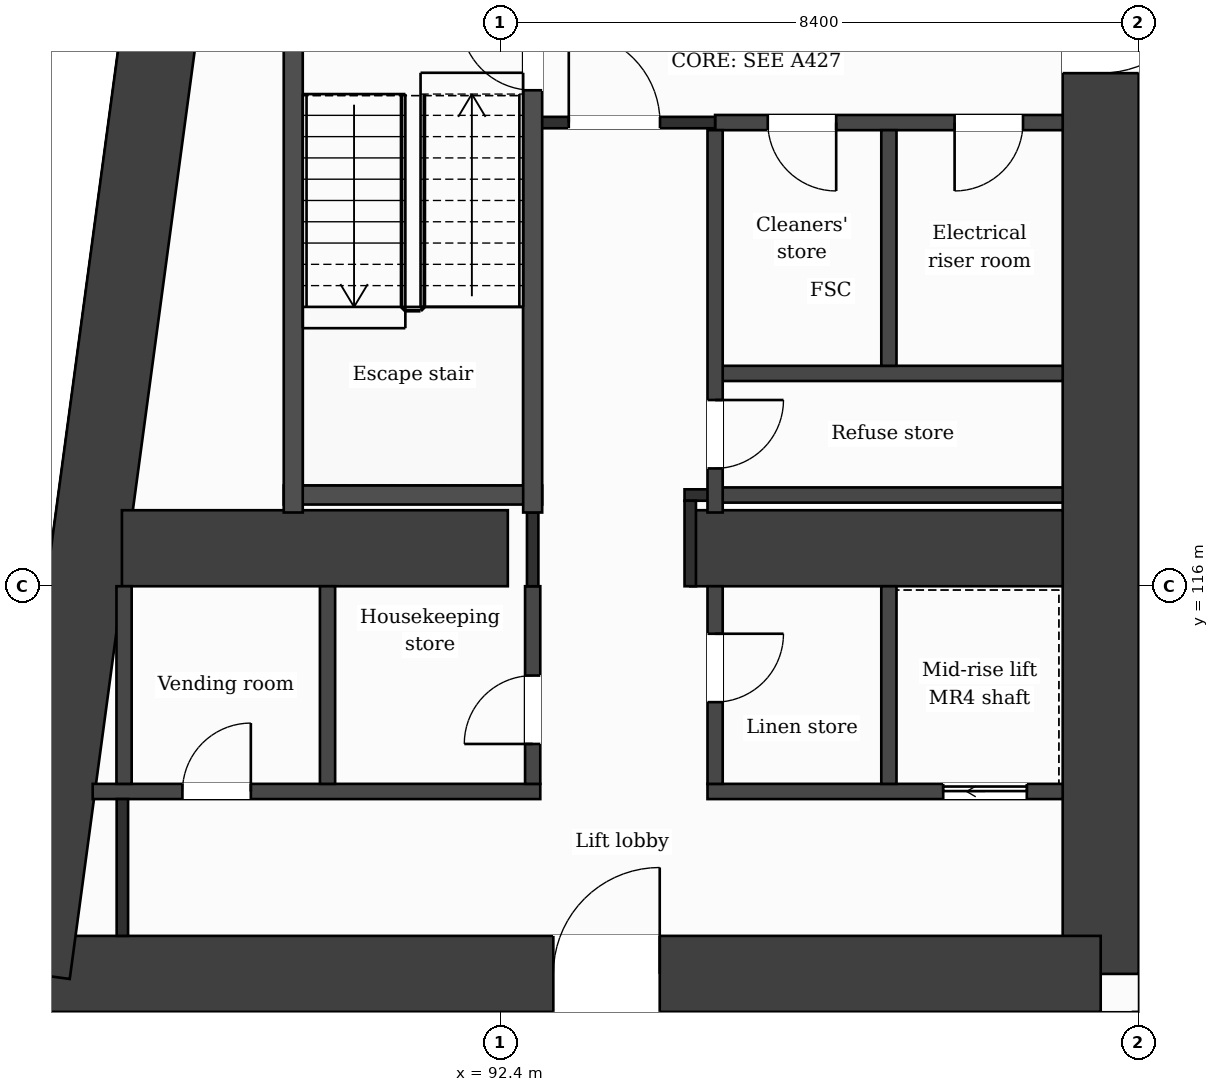
"""IFC4 building model, lengths in metres.
Left out: names, types, materials, properties, quantities, classifications, styles, units other than length and angle.
Written with IfcOpenShell. Run it as: python <this file> out.ifc"""

import sys

from ifc_helpers import new_model, si_unit, direction, frame, frame_2d, origin, place, context, subcontext, project, spatial, rectangle, extrude, element, fill, save


model = new_model("IFC4")
c1 = context("Model", 3, precision=1e-05, world=origin(), true_north=direction((0.0, 1.0)))
c2 = subcontext(c1, "Body", "Model", "MODEL_VIEW")
j1 = project(units=[si_unit("LENGTHUNIT", "METRE"), si_unit("PLANEANGLEUNIT", "RADIAN")], contexts=[c1])
p1 = place(None, origin())
s1 = spatial("IfcSite", under=j1, at=p1, CompositionType="ELEMENT")
p2 = place(p1, origin())
s2 = spatial("IfcBuilding", under=s1, at=p2, CompositionType="ELEMENT")
p3 = place(p2, frame((0.0, 0.0, 113.2)))
s3 = spatial("IfcBuildingStorey", under=s2, at=p3, CompositionType="ELEMENT", Elevation=113.2)
p4 = place(p3, frame((100.3, 131.9, 0.0), z_axis=(0.0, 0.0, 1.0), x_axis=(0.0, -1.0, 0.0)))
e1 = element("IfcWall", 1, at=p4, inside=s3, PredefinedType="SHEAR", context=c2, shape_type="SweptSolid", body=[
    extrude(rectangle(XDim=21.0, YDim=1.0, at=frame_2d((10.5, 0.0))), origin(), (0.0, 0.0, 1.0), 3.7),
])
p5 = place(p4, frame((7.75, 0.0, 0.0)))
e2 = element("IfcOpeningElement", 2, at=p5, cuts=e1, PredefinedType="OPENING", context=c2, shape_type="SweptSolid", body=[
    extrude(rectangle(XDim=1.4, YDim=2.1, at=frame_2d((0.7, 1.05))), frame((0.0, 0.51, 0.0), z_axis=(0.0, -1.0, 0.0), x_axis=(1.0, 0.0, 0.0)), (0.0, 0.0, 1.0), 1.02),
])
p6 = place(p3, frame((100.3, 110.9, 0.0), z_axis=(0.0, 0.0, 1.0), x_axis=(-1.0, 0.0, 0.0)))
e3 = element("IfcWall", 3, at=p6, inside=s3, PredefinedType="SHEAR", context=c2, shape_type="SweptSolid", body=[
    extrude(rectangle(XDim=14.059, YDim=1.0, at=frame_2d((7.03, 0.0))), origin(), (0.0, 0.0, 1.0), 3.7),
])
p7 = place(p6, frame((5.802, 0.0, 0.0)))
e4 = element("IfcOpeningElement", 4, at=p7, cuts=e3, PredefinedType="OPENING", context=c2, shape_type="SweptSolid", body=[
    extrude(rectangle(XDim=1.4, YDim=2.1, at=frame_2d((0.7, 1.05))), frame((0.0, 0.51, 0.0), z_axis=(0.0, -1.0, 0.0), x_axis=(1.0, 0.0, 0.0)), (0.0, 0.0, 1.0), 1.02),
])
p8 = place(p3, frame((86.241, 110.9, 0.0), z_axis=(0.0, 0.0, 1.0), x_axis=(0.133411141623, 0.991060778808, 0.0)))
e5 = element("IfcWall", 5, at=p8, inside=s3, PredefinedType="SHEAR", context=c2, shape_type="SweptSolid", body=[
    extrude(rectangle(XDim=21.189, YDim=1.0, at=frame_2d((10.595, 0.0))), origin(), (0.0, 0.0, 1.0), 3.7),
])
p9 = place(p3, frame((87.423, 116.5, 0.0), z_axis=(0.0, 0.0, 1.0), x_axis=(1.0, 0.0, 0.0)))
e6 = element("IfcWall", 6, at=p9, inside=s3, PredefinedType="SHEAR", context=c2, shape_type="SweptSolid", body=[
    extrude(rectangle(XDim=5.077, YDim=1.0, at=frame_2d((2.539, 0.0))), origin(), (0.0, 0.0, 1.0), 3.7),
])
p10 = place(p3, frame((94.9, 116.5, 0.0), z_axis=(0.0, 0.0, 1.0), x_axis=(1.0, 0.0, 0.0)))
e7 = element("IfcWall", 7, at=p10, inside=s3, PredefinedType="SHEAR", context=c2, shape_type="SweptSolid", body=[
    extrude(rectangle(XDim=4.9, YDim=1.0, at=frame_2d((2.45, 0.0))), origin(), (0.0, 0.0, 1.0), 3.7),
])
p11 = place(p3, frame((87.334, 110.4, 0.0), z_axis=(0.0, 0.0, 1.0), x_axis=(-0.133437175554, -0.991057273915, 0.0)))
e8 = element("IfcWall", 8, at=p11, inside=s3, PredefinedType="SOLIDWALL", context=c2, shape_type="SweptSolid", body=[
    extrude(rectangle(XDim=6.781, YDim=0.3, at=frame_2d((3.39, 0.0))), origin(), (0.0, 0.0, 1.0), 3.38),
])
p12 = place(p11, frame((1.418, 0.0, 0.0)))
e9 = element("IfcOpeningElement", 9, at=p12, cuts=e8, PredefinedType="OPENING", context=c2, shape_type="SweptSolid", body=[
    extrude(rectangle(XDim=1.2, YDim=2.4, at=frame_2d((0.6, 1.2))), frame((0.0, 0.16, 0.0), z_axis=(0.0, -1.0, 0.0), x_axis=(1.0, 0.0, 0.0)), (0.0, 0.0, 1.0), 0.32),
])
p13 = place(p11, frame((4.758, 0.0, 0.9)))
e10 = element("IfcOpeningElement", 10, at=p13, cuts=e8, PredefinedType="OPENING", context=c2, shape_type="SweptSolid", body=[
    extrude(rectangle(XDim=1.2, YDim=2.1, at=frame_2d((0.6, 1.05))), frame((0.0, 0.16, 0.0), z_axis=(0.0, -1.0, 0.0), x_axis=(1.0, 0.0, 0.0)), (0.0, 0.0, 1.0), 0.32),
])
p14 = place(p3, frame((87.039, 113.3, 0.0), z_axis=(0.0, 0.0, 1.0), x_axis=(1.0, 0.0, 0.0)))
e11 = element("IfcWall", 11, at=p14, inside=s3, PredefinedType="PARTITIONING", context=c2, shape_type="SweptSolid", body=[
    extrude(rectangle(XDim=5.888, YDim=0.2, at=frame_2d((2.944, 0.0))), origin(), (0.0, 0.0, 1.0), 3.38),
])
p15 = place(p14, frame((1.18, 0.0, 0.0)))
e12 = element("IfcOpeningElement", 12, at=p15, cuts=e11, PredefinedType="OPENING", context=c2, shape_type="SweptSolid", body=[
    extrude(rectangle(XDim=0.9, YDim=2.1, at=frame_2d((0.45, 1.05))), frame((0.0, 0.11, 0.0), z_axis=(0.0, -1.0, 0.0), x_axis=(1.0, 0.0, 0.0)), (0.0, 0.0, 1.0), 0.22),
])
p16 = place(p3, frame((95.127, 113.3, 0.0), z_axis=(0.0, 0.0, 1.0), x_axis=(1.0, 0.0, 0.0)))
e13 = element("IfcWall", 13, at=p16, inside=s3, PredefinedType="PARTITIONING", context=c2, shape_type="SweptSolid", body=[
    extrude(rectangle(XDim=4.673, YDim=0.2, at=frame_2d((2.336, 0.0))), origin(), (0.0, 0.0, 1.0), 3.38),
])
p17 = place(p16, frame((3.101, 0.0, 0.0)))
e14 = element("IfcOpeningElement", 14, at=p17, cuts=e13, PredefinedType="OPENING", context=c2, shape_type="SweptSolid", body=[
    extrude(rectangle(XDim=1.1, YDim=2.1, at=frame_2d((0.55, 1.05))), frame((0.0, 0.11, 0.0), z_axis=(0.0, -1.0, 0.0), x_axis=(1.0, 0.0, 0.0)), (0.0, 0.0, 1.0), 0.22),
])
p18 = place(p3, frame((95.227, 117.2, 0.0), z_axis=(0.0, 0.0, 1.0), x_axis=(1.0, 0.0, 0.0)))
e15 = element("IfcWall", 15, at=p18, inside=s3, PredefinedType="PARTITIONING", context=c2, shape_type="SweptSolid", body=[
    extrude(rectangle(XDim=4.573, YDim=0.2, at=frame_2d((2.287, 0.0))), origin(), (0.0, 0.0, 1.0), 3.38),
])
p19 = place(p3, frame((94.825, 117.2, 0.0), z_axis=(0.0, 0.0, 1.0), x_axis=(1.0, 0.0, 0.0)))
e16 = element("IfcWall", 16, at=p19, inside=s3, PredefinedType="PARTITIONING", context=c2, shape_type="SweptSolid", body=[
    extrude(rectangle(XDim=0.402, YDim=0.15, at=frame_2d((0.201, 0.0))), origin(), (0.0, 0.0, 1.0), 3.38),
])
p20 = place(p3, frame((89.552, 117.2, 0.0), z_axis=(0.0, 0.0, 1.0), x_axis=(1.0, 0.0, 0.0)))
e17 = element("IfcWall", 17, at=p20, inside=s3, PredefinedType="PARTITIONING", context=c2, shape_type="SweptSolid", body=[
    extrude(rectangle(XDim=3.4, YDim=0.25, at=frame_2d((1.7, 0.0))), origin(), (0.0, 0.0, 1.0), 3.38),
])
p21 = place(p3, frame((95.227, 118.8, 0.0), z_axis=(0.0, 0.0, 1.0), x_axis=(1.0, 0.0, 0.0)))
e18 = element("IfcWall", 18, at=p21, inside=s3, PredefinedType="PARTITIONING", context=c2, shape_type="SweptSolid", body=[
    extrude(rectangle(XDim=4.573, YDim=0.2, at=frame_2d((2.287, 0.0))), origin(), (0.0, 0.0, 1.0), 3.38),
])
p22 = place(p3, frame((95.227, 122.1, 0.0), z_axis=(0.0, 0.0, 1.0), x_axis=(1.0, 0.0, 0.0)))
e19 = element("IfcWall", 19, at=p22, inside=s3, PredefinedType="PARTITIONING", context=c2, shape_type="SweptSolid", body=[
    extrude(rectangle(XDim=4.573, YDim=0.2, at=frame_2d((2.287, 0.0))), origin(), (0.0, 0.0, 1.0), 3.38),
])
p23 = place(p22, frame((0.693, 0.0, 0.0)))
e20 = element("IfcOpeningElement", 20, at=p23, cuts=e19, PredefinedType="OPENING", context=c2, shape_type="SweptSolid", body=[
    extrude(rectangle(XDim=0.9, YDim=2.1, at=frame_2d((0.45, 1.05))), frame((0.0, 0.11, 0.0), z_axis=(0.0, -1.0, 0.0), x_axis=(1.0, 0.0, 0.0)), (0.0, 0.0, 1.0), 0.22),
])
p24 = place(p22, frame((3.151, 0.0, 0.0)))
e21 = element("IfcOpeningElement", 21, at=p24, cuts=e19, PredefinedType="OPENING", context=c2, shape_type="SweptSolid", body=[
    extrude(rectangle(XDim=0.9, YDim=2.1, at=frame_2d((0.45, 1.05))), frame((0.0, 0.11, 0.0), z_axis=(0.0, -1.0, 0.0), x_axis=(1.0, 0.0, 0.0)), (0.0, 0.0, 1.0), 0.22),
])
p25 = place(p3, frame((92.827, 122.1, 0.0), z_axis=(0.0, 0.0, 1.0), x_axis=(1.0, 0.0, 0.0)))
e22 = element("IfcWall", 22, at=p25, inside=s3, PredefinedType="PARTITIONING", context=c2, shape_type="SweptSolid", body=[
    extrude(rectangle(XDim=2.4, YDim=0.15, at=frame_2d((1.2, 0.0))), origin(), (0.0, 0.0, 1.0), 3.38),
])
p26 = place(p25, frame((0.475, 0.0, 0.0)))
e23 = element("IfcOpeningElement", 23, at=p26, cuts=e22, PredefinedType="OPENING", context=c2, shape_type="SweptSolid", body=[
    extrude(rectangle(XDim=1.2, YDim=2.1, at=frame_2d((0.6, 1.05))), frame((0.0, 0.085, 0.0), z_axis=(0.0, -1.0, 0.0), x_axis=(1.0, 0.0, 0.0)), (0.0, 0.0, 1.0), 0.17),
])
p27 = place(p3, frame((87.451, 113.4, 0.0), z_axis=(0.0, 0.0, 1.0), x_axis=(0.0, 1.0, 0.0)))
e24 = element("IfcWall", 24, at=p27, inside=s3, PredefinedType="PARTITIONING", context=c2, shape_type="SweptSolid", body=[
    extrude(rectangle(XDim=2.6, YDim=0.2, at=frame_2d((1.3, 0.0))), origin(), (0.0, 0.0, 1.0), 3.38),
])
p28 = place(p3, frame((87.429, 111.4, 0.0), z_axis=(0.0, 0.0, 1.0), x_axis=(0.0, 1.0, 0.0)))
e25 = element("IfcWall", 25, at=p28, inside=s3, PredefinedType="PARTITIONING", context=c2, shape_type="SweptSolid", body=[
    extrude(rectangle(XDim=1.8, YDim=0.15, at=frame_2d((0.9, 0.0))), origin(), (0.0, 0.0, 1.0), 3.38),
])
p29 = place(p3, frame((89.677, 116.97, 0.0), z_axis=(0.0, 0.0, 1.0), x_axis=(0.0, 1.0, 0.0)))
e26 = element("IfcWall", 26, at=p29, inside=s3, PredefinedType="PARTITIONING", context=c2, shape_type="SweptSolid", body=[
    extrude(rectangle(XDim=6.855, YDim=0.25, at=frame_2d((3.427, 0.0))), origin(), (0.0, 0.0, 1.0), 3.38),
])
p30 = place(p3, frame((90.128, 113.4, 0.0), z_axis=(0.0, 0.0, 1.0), x_axis=(0.0, 1.0, 0.0)))
e27 = element("IfcWall", 27, at=p30, inside=s3, PredefinedType="PARTITIONING", context=c2, shape_type="SweptSolid", body=[
    extrude(rectangle(XDim=2.6, YDim=0.2, at=frame_2d((1.3, 0.0))), origin(), (0.0, 0.0, 1.0), 3.38),
])
p31 = place(p3, frame((92.827, 113.4, 0.0), z_axis=(0.0, 0.0, 1.0), x_axis=(0.0, 1.0, 0.0)))
e28 = element("IfcWall", 28, at=p31, inside=s3, PredefinedType="PARTITIONING", context=c2, shape_type="SweptSolid", body=[
    extrude(rectangle(XDim=2.6, YDim=0.2, at=frame_2d((1.3, 0.0))), origin(), (0.0, 0.0, 1.0), 3.38),
])
p32 = place(p31, frame((0.525, 0.0, 0.0)))
e29 = element("IfcOpeningElement", 29, at=p32, cuts=e28, PredefinedType="OPENING", context=c2, shape_type="SweptSolid", body=[
    extrude(rectangle(XDim=0.9, YDim=2.1, at=frame_2d((0.45, 1.05))), frame((0.0, 0.11, 0.0), z_axis=(0.0, -1.0, 0.0), x_axis=(1.0, 0.0, 0.0)), (0.0, 0.0, 1.0), 0.22),
])
p33 = place(p3, frame((92.827, 116.0, 0.0), z_axis=(0.0, 0.0, 1.0), x_axis=(0.0, 1.0, 0.0)))
e30 = element("IfcWall", 30, at=p33, inside=s3, PredefinedType="PARTITIONING", context=c2, shape_type="SweptSolid", body=[
    extrude(rectangle(XDim=0.97, YDim=0.15, at=frame_2d((0.485, 0.0))), origin(), (0.0, 0.0, 1.0), 3.38),
])
p34 = place(p3, frame((92.827, 116.97, 0.0), z_axis=(0.0, 0.0, 1.0), x_axis=(0.0, 1.0, 0.0)))
e31 = element("IfcWall", 31, at=p34, inside=s3, PredefinedType="PARTITIONING", context=c2, shape_type="SweptSolid", body=[
    extrude(rectangle(XDim=6.855, YDim=0.25, at=frame_2d((3.427, 0.0))), origin(), (0.0, 0.0, 1.0), 3.38),
])
p35 = place(p34, frame((5.555, 0.0, 0.0)))
e32 = element("IfcOpeningElement", 32, at=p35, cuts=e31, PredefinedType="OPENING", context=c2, shape_type="SweptSolid", body=[
    extrude(rectangle(XDim=0.95, YDim=2.1, at=frame_2d((0.475, 1.05))), frame((0.0, 0.135, 0.0), z_axis=(0.0, -1.0, 0.0), x_axis=(1.0, 0.0, 0.0)), (0.0, 0.0, 1.0), 0.27),
])
p36 = place(p3, frame((94.9, 116.0, 0.0), z_axis=(0.0, 0.0, 1.0), x_axis=(0.0, 1.0, 0.0)))
e33 = element("IfcWall", 33, at=p36, inside=s3, PredefinedType="PARTITIONING", context=c2, shape_type="SweptSolid", body=[
    extrude(rectangle(XDim=1.125, YDim=0.15, at=frame_2d((0.562, 0.0))), origin(), (0.0, 0.0, 1.0), 3.38),
])
p37 = place(p3, frame((95.227, 113.4, 0.0), z_axis=(0.0, 0.0, 1.0), x_axis=(0.0, 1.0, 0.0)))
e34 = element("IfcWall", 34, at=p37, inside=s3, PredefinedType="PARTITIONING", context=c2, shape_type="SweptSolid", body=[
    extrude(rectangle(XDim=2.6, YDim=0.2, at=frame_2d((1.3, 0.0))), origin(), (0.0, 0.0, 1.0), 3.38),
])
p38 = place(p37, frame((1.075, 0.0, 0.0)))
e35 = element("IfcOpeningElement", 35, at=p38, cuts=e34, PredefinedType="OPENING", context=c2, shape_type="SweptSolid", body=[
    extrude(rectangle(XDim=0.9, YDim=2.1, at=frame_2d((0.45, 1.05))), frame((0.0, 0.11, 0.0), z_axis=(0.0, -1.0, 0.0), x_axis=(1.0, 0.0, 0.0)), (0.0, 0.0, 1.0), 0.22),
])
p39 = place(p3, frame((95.227, 116.97, 0.0), z_axis=(0.0, 0.0, 1.0), x_axis=(0.0, 1.0, 0.0)))
e36 = element("IfcWall", 36, at=p39, inside=s3, PredefinedType="PARTITIONING", context=c2, shape_type="SweptSolid", body=[
    extrude(rectangle(XDim=5.03, YDim=0.2, at=frame_2d((2.515, 0.0))), origin(), (0.0, 0.0, 1.0), 3.38),
])
p40 = place(p39, frame((0.58, 0.0, 0.0)))
e37 = element("IfcOpeningElement", 37, at=p40, cuts=e36, PredefinedType="OPENING", context=c2, shape_type="SweptSolid", body=[
    extrude(rectangle(XDim=0.9, YDim=2.1, at=frame_2d((0.45, 1.05))), frame((0.0, 0.11, 0.0), z_axis=(0.0, -1.0, 0.0), x_axis=(1.0, 0.0, 0.0)), (0.0, 0.0, 1.0), 0.22),
])
p41 = place(p3, frame((97.513, 113.4, 0.0), z_axis=(0.0, 0.0, 1.0), x_axis=(0.0, 1.0, 0.0)))
e38 = element("IfcWall", 38, at=p41, inside=s3, PredefinedType="PARTITIONING", context=c2, shape_type="SweptSolid", body=[
    extrude(rectangle(XDim=2.6, YDim=0.2, at=frame_2d((1.3, 0.0))), origin(), (0.0, 0.0, 1.0), 3.38),
])
p42 = place(p3, frame((97.513, 118.9, 0.0), z_axis=(0.0, 0.0, 1.0), x_axis=(0.0, 1.0, 0.0)))
e39 = element("IfcWall", 39, at=p42, inside=s3, PredefinedType="PARTITIONING", context=c2, shape_type="SweptSolid", body=[
    extrude(rectangle(XDim=3.1, YDim=0.2, at=frame_2d((1.55, 0.0))), origin(), (0.0, 0.0, 1.0), 3.38),
])
p43 = place(p3, frame((100.8, 109.075, 0.0), z_axis=(0.0, 0.0, 1.0), x_axis=(0.0, 1.0, 0.0)))
e40 = element("IfcWall", 40, at=p43, inside=s3, PredefinedType="PARTITIONING", context=c2, shape_type="SweptSolid", body=[
    extrude(rectangle(XDim=1.325, YDim=0.15, at=frame_2d((0.663, 0.0))), origin(), (0.0, 0.0, 1.0), 3.38),
])
p44 = place(p26, origin())
e41 = element("IfcDoor", 41, at=p44, inside=s3, OperationType="SINGLE_SWING_LEFT", PredefinedType="DOOR", context=c2, shape_type="SweptSolid", body=[
    extrude(rectangle(XDim=1.2, YDim=2.1, at=frame_2d((0.6, 1.05))), frame((0.0, 0.025, 0.0), z_axis=(0.0, -1.0, 0.0), x_axis=(1.0, 0.0, 0.0)), (0.0, 0.0, 1.0), 0.05),
])
fill(e23, e41)
p45 = place(p23, origin())
e42 = element("IfcDoor", 42, at=p45, inside=s3, OperationType="SINGLE_SWING_RIGHT", PredefinedType="DOOR", context=c2, shape_type="SweptSolid", body=[
    extrude(rectangle(XDim=0.9, YDim=2.1, at=frame_2d((0.45, 1.05))), frame((0.0, 0.025, 0.0), z_axis=(0.0, -1.0, 0.0), x_axis=(1.0, 0.0, 0.0)), (0.0, 0.0, 1.0), 0.05),
])
fill(e20, e42)
p46 = place(p24, origin())
e43 = element("IfcDoor", 43, at=p46, inside=s3, OperationType="SINGLE_SWING_LEFT", PredefinedType="DOOR", context=c2, shape_type="SweptSolid", body=[
    extrude(rectangle(XDim=0.9, YDim=2.1, at=frame_2d((0.45, 1.05))), frame((0.0, 0.025, 0.0), z_axis=(0.0, -1.0, 0.0), x_axis=(1.0, 0.0, 0.0)), (0.0, 0.0, 1.0), 0.05),
])
fill(e21, e43)
p47 = place(p35, origin())
e44 = element("IfcDoor", 44, at=p47, inside=s3, OperationType="SINGLE_SWING_RIGHT", PredefinedType="DOOR", context=c2, shape_type="SweptSolid", body=[
    extrude(rectangle(XDim=0.95, YDim=2.1, at=frame_2d((0.475, 1.05))), frame((0.0, 0.025, 0.0), z_axis=(0.0, -1.0, 0.0), x_axis=(1.0, 0.0, 0.0)), (0.0, 0.0, 1.0), 0.05),
])
fill(e32, e44)
p48 = place(p40, origin())
e45 = element("IfcDoor", 45, at=p48, inside=s3, OperationType="SINGLE_SWING_RIGHT", PredefinedType="DOOR", context=c2, shape_type="SweptSolid", body=[
    extrude(rectangle(XDim=0.9, YDim=2.1, at=frame_2d((0.45, 1.05))), frame((0.0, 0.025, 0.0), z_axis=(0.0, -1.0, 0.0), x_axis=(1.0, 0.0, 0.0)), (0.0, 0.0, 1.0), 0.05),
])
fill(e37, e45)
p49 = place(p17, origin())
e46 = element("IfcDoor", 46, at=p49, inside=s3, OperationType="SLIDING_TO_LEFT", PredefinedType="DOOR", context=c2, shape_type="SweptSolid", body=[
    extrude(rectangle(XDim=1.1, YDim=2.1, at=frame_2d((0.55, 1.05))), frame((0.0, 0.025, 0.0), z_axis=(0.0, -1.0, 0.0), x_axis=(1.0, 0.0, 0.0)), (0.0, 0.0, 1.0), 0.05),
])
fill(e14, e46)
p50 = place(p15, origin())
e47 = element("IfcDoor", 47, at=p50, inside=s3, OperationType="SINGLE_SWING_RIGHT", PredefinedType="DOOR", context=c2, shape_type="SweptSolid", body=[
    extrude(rectangle(XDim=0.9, YDim=2.1, at=frame_2d((0.45, 1.05))), frame((0.0, 0.025, 0.0), z_axis=(0.0, -1.0, 0.0), x_axis=(1.0, 0.0, 0.0)), (0.0, 0.0, 1.0), 0.05),
])
fill(e12, e47)
p51 = place(p32, origin())
e48 = element("IfcDoor", 48, at=p51, inside=s3, OperationType="SINGLE_SWING_LEFT", PredefinedType="DOOR", context=c2, shape_type="SweptSolid", body=[
    extrude(rectangle(XDim=0.9, YDim=2.1, at=frame_2d((0.45, 1.05))), frame((0.0, 0.025, 0.0), z_axis=(0.0, -1.0, 0.0), x_axis=(1.0, 0.0, 0.0)), (0.0, 0.0, 1.0), 0.05),
])
fill(e29, e48)
p52 = place(p38, origin())
e49 = element("IfcDoor", 49, at=p52, inside=s3, OperationType="SINGLE_SWING_RIGHT", PredefinedType="DOOR", context=c2, shape_type="SweptSolid", body=[
    extrude(rectangle(XDim=0.9, YDim=2.1, at=frame_2d((0.45, 1.05))), frame((0.0, 0.025, 0.0), z_axis=(0.0, -1.0, 0.0), x_axis=(1.0, 0.0, 0.0)), (0.0, 0.0, 1.0), 0.05),
])
fill(e35, e49)
p53 = place(p7, origin())
e50 = element("IfcDoor", 50, at=p53, inside=s3, OperationType="SINGLE_SWING_LEFT", PredefinedType="DOOR", context=c2, shape_type="SweptSolid", body=[
    extrude(rectangle(XDim=1.4, YDim=2.1, at=frame_2d((0.7, 1.05))), frame((0.0, 0.025, 0.0), z_axis=(0.0, -1.0, 0.0), x_axis=(1.0, 0.0, 0.0)), (0.0, 0.0, 1.0), 0.05),
])
fill(e4, e50)
p54 = place(p5, origin())
e51 = element("IfcDoor", 51, at=p54, inside=s3, OperationType="SINGLE_SWING_LEFT", PredefinedType="DOOR", context=c2, shape_type="SweptSolid", body=[
    extrude(rectangle(XDim=1.4, YDim=2.1, at=frame_2d((0.7, 1.05))), frame((0.0, 0.025, 0.0), z_axis=(0.0, -1.0, 0.0), x_axis=(1.0, 0.0, 0.0)), (0.0, 0.0, 1.0), 0.05),
])
fill(e2, e51)
save(model, sys.argv[1])
